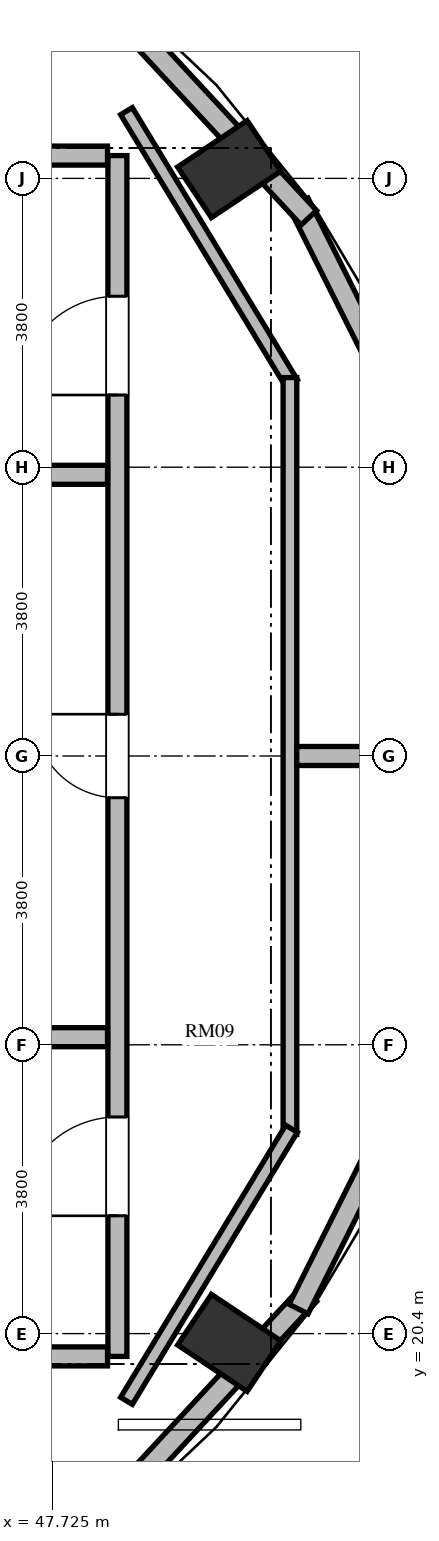
"""IFC4 building model, lengths in metres.
Left out: names, types, materials, properties, quantities, classifications, styles, units other than length and angle.
Written with IfcOpenShell. Run it as: python <this file> out.ifc"""

import sys

from ifc_helpers import new_model, si_unit, direction, frame, frame_2d, origin, origin_2d, place, context, subcontext, project, spatial, rectangle, extrude, element, fill, save


model = new_model("IFC4")
c1 = context("Model", 3, precision=1e-05, world=origin(), true_north=direction((0.0, 1.0)))
c2 = subcontext(c1, "Body", "Model", "MODEL_VIEW")
j1 = project(units=[si_unit("LENGTHUNIT", "METRE"), si_unit("PLANEANGLEUNIT", "RADIAN")], contexts=[c1])
p1 = place(None, origin())
s1 = spatial("IfcSite", under=j1, at=p1, CompositionType="ELEMENT")
p2 = place(p1, origin())
s2 = spatial("IfcBuilding", under=s1, at=p2, CompositionType="ELEMENT")
p3 = place(p2, frame((0.0, 0.0, 302.448)))
s3 = spatial("IfcBuildingStorey", under=s2, at=p3, CompositionType="ELEMENT", Elevation=302.448)
for number, where, z_axis, x_axis in (
    (1, (50.052, 20.278, 0.0), (0.0, 0.0, 1.0), (0.831, -0.556, 0.0)),
    (2, (50.052, 35.722, 0.0), (0.0, 0.0, 1.0), (0.831, 0.556, 0.0)),
):
    element("IfcColumn", number, at=place(p3, frame(where, z_axis=z_axis, x_axis=x_axis)), inside=s3, PredefinedType="COLUMN", context=c2, shape_type="SweptSolid", body=[
        extrude(rectangle(XDim=1.1, YDim=0.8, at=origin_2d()), origin(), (0.0, 0.0, 1.0), 3.388),
    ])
p4 = place(p3, frame((48.18, 17.772, 0.0), z_axis=(0.0, 0.0, 1.0), x_axis=(0.680156447476, 0.733066986678, 0.0)))
e3 = element("IfcWall", 3, at=p4, inside=s3, PredefinedType="SOLIDWALL", context=c2, shape_type="SweptSolid", body=[
    extrude(rectangle(XDim=4.291, YDim=0.28, at=frame_2d((2.146, 0.0))), origin(), (0.0, 0.0, 1.0), 3.068),
])
for number, where, z_axis, x_axis in (
    (4, (50.963, 20.723, 0.0), (0.0, 0.0, 1.0), (0.448, 0.894, 0.0)),
    (5, (52.803, 31.604, 0.0), (0.0, 0.0, 1.0), (-0.448, 0.894, 0.0)),
):
    element("IfcWall", number, at=place(p3, frame(where, z_axis=z_axis, x_axis=x_axis)), inside=s3, PredefinedType="SOLIDWALL", context=c2, shape_type="SweptSolid", body=[
        extrude(rectangle(XDim=4.108, YDim=0.28, at=frame_2d((2.054, 0.0))), origin(), (0.0, 0.0, 1.0), 3.068),
    ])
p5 = place(p3, frame((51.098, 35.082, 0.0), z_axis=(0.0, 0.0, 1.0), x_axis=(-0.680156447476, 0.733066986678, 0.0)))
e6 = element("IfcWall", 6, at=p5, inside=s3, PredefinedType="SOLIDWALL", context=c2, shape_type="SweptSolid", body=[
    extrude(rectangle(XDim=4.291, YDim=0.28, at=frame_2d((2.146, 0.0))), origin(), (0.0, 0.0, 1.0), 3.068),
])
p6 = place(p3, frame((48.58, 20.1, 0.0), z_axis=(0.0, 0.0, 1.0), x_axis=(0.0, 1.0, 0.0)))
e7 = element("IfcWall", 7, at=p6, inside=s3, PredefinedType="SOLIDWALL", context=c2, shape_type="SweptSolid", body=[
    extrude(rectangle(XDim=15.8, YDim=0.25, at=frame_2d((7.9, 0.0))), origin(), (0.0, 0.0, 1.0), 3.068),
])
p7 = place(p6, frame((12.65, 0.0, 0.0)))
e8 = element("IfcOpeningElement", 8, at=p7, cuts=e7, PredefinedType="OPENING", context=c2, shape_type="SweptSolid", body=[
    extrude(rectangle(XDim=1.3, YDim=2.2, at=frame_2d((0.65, 1.1))), frame((0.0, 0.135, 0.0), z_axis=(0.0, -1.0, 0.0), x_axis=(1.0, 0.0, 0.0)), (0.0, 0.0, 1.0), 0.27),
])
p8 = place(p6, frame((7.35, 0.0, 0.0)))
e9 = element("IfcOpeningElement", 9, at=p8, cuts=e7, PredefinedType="OPENING", context=c2, shape_type="SweptSolid", body=[
    extrude(rectangle(XDim=1.1, YDim=2.15, at=frame_2d((0.55, 1.075))), frame((0.0, 0.135, 0.0), z_axis=(0.0, -1.0, 0.0), x_axis=(1.0, 0.0, 0.0)), (0.0, 0.0, 1.0), 0.27),
])
p9 = place(p6, frame((1.85, 0.0, 0.0)))
e10 = element("IfcOpeningElement", 10, at=p9, cuts=e7, PredefinedType="OPENING", context=c2, shape_type="SweptSolid", body=[
    extrude(rectangle(XDim=1.3, YDim=2.2, at=frame_2d((0.65, 1.1))), frame((0.0, 0.135, 0.0), z_axis=(0.0, -1.0, 0.0), x_axis=(1.0, 0.0, 0.0)), (0.0, 0.0, 1.0), 0.27),
])
for number, where, z_axis, x_axis in (
    (11, (45.93, 35.9, 0.0), (0.0, 0.0, 1.0), (1.0, 0.0, 0.0)),
    (12, (45.93, 31.7, 0.0), (0.0, 0.0, 1.0), (1.0, 0.0, 0.0)),
    (13, (45.93, 24.3, 0.0), (0.0, 0.0, 1.0), (1.0, 0.0, 0.0)),
    (14, (45.93, 20.1, 0.0), (0.0, 0.0, 1.0), (1.0, 0.0, 0.0)),
):
    element("IfcWall", number, at=place(p3, frame(where, z_axis=z_axis, x_axis=x_axis)), inside=s3, PredefinedType="SOLIDWALL", context=c2, shape_type="SweptSolid", body=[
        extrude(rectangle(XDim=2.52, YDim=0.25, at=frame_2d((1.26, 0.0))), origin(), (0.0, 0.0, 1.0), 3.068),
    ])
p10 = place(p3, frame((48.699, 36.485, 0.0), z_axis=(0.0, 0.0, 1.0), x_axis=(0.518614420457, -0.855008235571, 0.0)))
e15 = element("IfcWall", 15, at=p10, inside=s3, PredefinedType="PARTITIONING", context=c2, shape_type="SweptSolid", body=[
    extrude(rectangle(XDim=4.187, YDim=0.18, at=frame_2d((2.094, 0.0))), origin(), (0.0, 0.0, 1.0), 3.068),
])
p11 = place(p3, frame((50.85, 32.979, 0.0), z_axis=(0.0, 0.0, 1.0), x_axis=(0.0, -1.0, 0.0)))
e16 = element("IfcWall", 16, at=p11, inside=s3, PredefinedType="PARTITIONING", context=c2, shape_type="SweptSolid", body=[
    extrude(rectangle(XDim=9.958, YDim=0.18, at=frame_2d((4.979, 0.0))), origin(), (0.0, 0.0, 1.0), 3.068),
])
p12 = place(p3, frame((50.871, 23.095, 0.0), z_axis=(0.0, 0.0, 1.0), x_axis=(-0.518614420457, -0.855008235571, 0.0)))
e17 = element("IfcWall", 17, at=p12, inside=s3, PredefinedType="PARTITIONING", context=c2, shape_type="SweptSolid", body=[
    extrude(rectangle(XDim=4.187, YDim=0.18, at=frame_2d((2.094, 0.0))), origin(), (0.0, 0.0, 1.0), 3.068),
])
p13 = place(p3, frame((50.94, 28.0, 0.0), z_axis=(0.0, 0.0, 1.0), x_axis=(1.0, 0.0, 0.0)))
e18 = element("IfcWall", 18, at=p13, inside=s3, PredefinedType="SOLIDWALL", context=c2, shape_type="SweptSolid", body=[
    extrude(rectangle(XDim=2.365, YDim=0.25, at=frame_2d((1.183, 0.0))), origin(), (0.0, 0.0, 1.0), 3.068),
])
p14 = place(p7, origin())
e19 = element("IfcDoor", 19, at=p14, inside=s3, OperationType="SINGLE_SWING_LEFT", PredefinedType="DOOR", context=c2, shape_type="SweptSolid", body=[
    extrude(rectangle(XDim=1.3, YDim=2.2, at=frame_2d((0.65, 1.1))), frame((0.0, 0.025, 0.0), z_axis=(0.0, -1.0, 0.0), x_axis=(1.0, 0.0, 0.0)), (0.0, 0.0, 1.0), 0.05),
])
fill(e8, e19)
p15 = place(p8, origin())
e20 = element("IfcDoor", 20, at=p15, inside=s3, OperationType="SINGLE_SWING_RIGHT", PredefinedType="DOOR", context=c2, shape_type="SweptSolid", body=[
    extrude(rectangle(XDim=1.1, YDim=2.15, at=frame_2d((0.55, 1.075))), frame((0.0, 0.025, 0.0), z_axis=(0.0, -1.0, 0.0), x_axis=(1.0, 0.0, 0.0)), (0.0, 0.0, 1.0), 0.05),
])
fill(e9, e20)
p16 = place(p9, origin())
e21 = element("IfcDoor", 21, at=p16, inside=s3, OperationType="SINGLE_SWING_LEFT", PredefinedType="DOOR", context=c2, shape_type="SweptSolid", body=[
    extrude(rectangle(XDim=1.3, YDim=2.2, at=frame_2d((0.65, 1.1))), frame((0.0, 0.025, 0.0), z_axis=(0.0, -1.0, 0.0), x_axis=(1.0, 0.0, 0.0)), (0.0, 0.0, 1.0), 0.05),
])
fill(e10, e21)
save(model, sys.argv[1])
